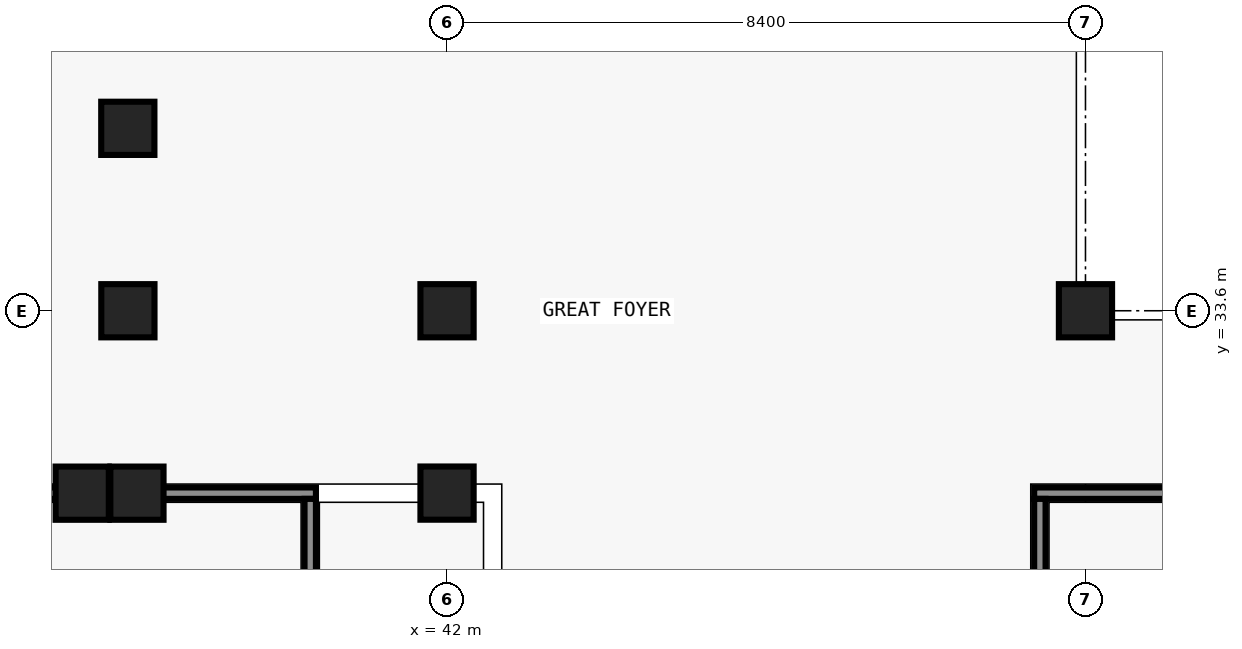
"""IFC4 building model, lengths in metres.
Left out: names, types, materials, properties, quantities, classifications, styles, units other than length and angle.
Written with IfcOpenShell. Run it as: python <this file> out.ifc"""

import sys

from ifc_helpers import new_model, si_unit, direction, frame, frame_2d, origin, origin_2d, place, context, subcontext, project, spatial, rectangle, extrude, element, save


model = new_model("IFC4")
c1 = context("Model", 3, precision=1e-05, world=origin(), true_north=direction((0.0, 1.0)))
c2 = subcontext(c1, "Body", "Model", "MODEL_VIEW")
j1 = project(units=[si_unit("LENGTHUNIT", "METRE"), si_unit("PLANEANGLEUNIT", "RADIAN")], contexts=[c1])
p1 = place(None, origin())
s1 = spatial("IfcSite", under=j1, at=p1, CompositionType="ELEMENT")
p2 = place(p1, origin())
s2 = spatial("IfcBuilding", under=s1, at=p2, CompositionType="ELEMENT")
p3 = place(p2, origin())
s3 = spatial("IfcBuildingStorey", under=s2, at=p3, CompositionType="ELEMENT", Elevation=0.0)
for number, where, z_axis, x_axis in (
    (1, (42.0, 33.6, -0.3), (0.0, 0.0, 1.0), (1.0, 0.0, 0.0)),
    (2, (50.4, 33.6, -0.3), (0.0, 0.0, 1.0), (1.0, 0.0, 0.0)),
    (3, (37.2, 31.2, -0.3), (0.0, 0.0, 1.0), (1.0, 0.0, 0.0)),
    (4, (42.0, 31.201, -0.3), (0.0, 0.0, 1.0), (1.0, 0.0, 0.0)),
    (5, (37.92, 31.2, -0.3), (0.0, 0.0, 1.0), (1.0, 0.0, 0.0)),
    (6, (37.8, 36.0, -0.3), (0.0, 0.0, 1.0), (1.0, 0.0, 0.0)),
    (7, (37.801, 33.6, -0.3), (0.0, 0.0, 1.0), (1.0, 0.0, 0.0)),
):
    element("IfcColumn", number, at=place(p3, frame(where, z_axis=z_axis, x_axis=x_axis)), inside=s3, PredefinedType="COLUMN", context=c2, shape_type="SweptSolid", body=[
        extrude(rectangle(XDim=0.7, YDim=0.7, at=origin_2d()), origin(), (0.0, 0.0, 1.0), 5.7),
    ])
p4 = place(p3, frame((49.725, 31.2, 0.0), z_axis=(0.0, 0.0, 1.0), x_axis=(1.0, 0.0, 0.0)))
e8 = element("IfcWall", 8, at=p4, inside=s3, PredefinedType="PARTITIONING", context=c2, shape_type="SweptSolid", body=[
    extrude(rectangle(XDim=9.075, YDim=0.15, at=frame_2d((4.538, 0.0))), origin(), (0.0, 0.0, 1.0), 4.4),
])
p5 = place(p4, frame((3.975, 0.0, 0.0)))
e9 = element("IfcOpeningElement", 9, at=p5, cuts=e8, PredefinedType="OPENING", context=c2, shape_type="SweptSolid", body=[
    extrude(rectangle(XDim=1.2, YDim=2.1, at=frame_2d((0.6, 1.05))), frame((0.0, 0.085, 0.0), z_axis=(0.0, -1.0, 0.0), x_axis=(1.0, 0.0, 0.0)), (0.0, 0.0, 1.0), 0.17),
])
p6 = place(p3, frame((34.725, 31.2, 0.0), z_axis=(0.0, 0.0, 1.0), x_axis=(1.0, 0.0, 0.0)))
e10 = element("IfcWall", 10, at=p6, inside=s3, PredefinedType="SOLIDWALL", context=c2, shape_type="SweptSolid", body=[
    extrude(rectangle(XDim=5.55, YDim=0.15, at=frame_2d((2.775, 0.0))), origin(), (0.0, 0.0, 1.0), 4.6),
])
p7 = place(p6, frame((0.775, 0.0, 0.0)))
e11 = element("IfcOpeningElement", 11, at=p7, cuts=e10, PredefinedType="OPENING", context=c2, shape_type="SweptSolid", body=[
    extrude(rectangle(XDim=1.2, YDim=2.1, at=frame_2d((0.6, 1.05))), frame((0.0, 0.085, 0.0), z_axis=(0.0, -1.0, 0.0), x_axis=(1.0, 0.0, 0.0)), (0.0, 0.0, 1.0), 0.17),
])
p8 = place(p3, frame((49.8, 28.3, 0.0), z_axis=(0.0, 0.0, 1.0), x_axis=(0.0, 1.0, 0.0)))
e12 = element("IfcWall", 12, at=p8, inside=s3, PredefinedType="PARTITIONING", context=c2, shape_type="SweptSolid", body=[
    extrude(rectangle(XDim=2.825, YDim=0.15, at=frame_2d((1.413, 0.0))), origin(), (0.0, 0.0, 1.0), 4.4),
])
p9 = place(p3, frame((40.2, 28.125, 0.0), z_axis=(0.0, 0.0, 1.0), x_axis=(0.0, 1.0, 0.0)))
e13 = element("IfcWall", 13, at=p9, inside=s3, PredefinedType="SOLIDWALL", context=c2, shape_type="SweptSolid", body=[
    extrude(rectangle(XDim=3.0, YDim=0.15, at=frame_2d((1.5, 0.0))), origin(), (0.0, 0.0, 1.0), 4.6),
])
save(model, sys.argv[1])
